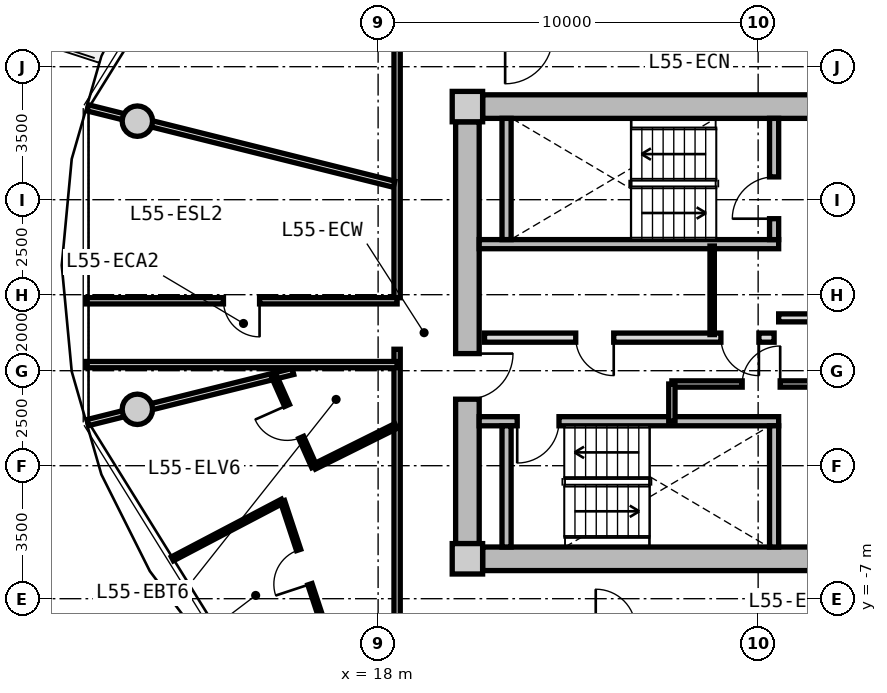
"""IFC4 building model, lengths in metres.
Left out: names, types, materials, properties, quantities, classifications, styles, units other than length and angle.
Written with IfcOpenShell. Run it as: python <this file> out.ifc"""

import sys

from ifc_helpers import new_model, si_unit, direction, frame, frame_2d, origin, origin_2d, place, context, subcontext, project, spatial, rectangle, circle, extrude, source, transform, mapped, element, fill, save


model = new_model("IFC4")
c1 = context("Model", 3, precision=1e-05, world=origin(), true_north=direction((0.0, 1.0)))
c2 = subcontext(c1, "Body", "Model", "MODEL_VIEW")
j1 = project(units=[si_unit("LENGTHUNIT", "METRE"), si_unit("PLANEANGLEUNIT", "RADIAN")], contexts=[c1])
p1 = place(None, origin())
s1 = spatial("IfcSite", under=j1, at=p1, CompositionType="ELEMENT")
p2 = place(p1, origin())
s2 = spatial("IfcBuilding", under=s1, at=p2, CompositionType="ELEMENT")
p3 = place(p2, frame((0.0, 0.0, 177.0)))
s3 = spatial("IfcBuildingStorey", under=s2, at=p3, CompositionType="ELEMENT", Elevation=177.0)
m1 = source(origin(), c2, "Body", "SweptSolid", [
    extrude(rectangle(XDim=0.8, YDim=0.8, at=origin_2d()), origin(), (0.0, 0.0, 1.0), 3.05),
])
for number, where, z_axis, x_axis in (
    (1, (20.35, -5.95, 0.0), (0.0, 0.0, 1.0), (1.0, 0.0, 0.0)),
    (2, (20.35, 5.95, 0.0), (0.0, 0.0, 1.0), (1.0, 0.0, 0.0)),
):
    element("IfcColumn", number, at=place(p3, frame(where, z_axis=z_axis, x_axis=x_axis)), inside=s3, PredefinedType="COLUMN", context=c2, shape_type="MappedRepresentation", body=[
        mapped(m1, transform((0.0, 0.0, 0.0), x_axis=(1.0, 0.0, 0.0), y_axis=(0.0, 1.0, 0.0), z_axis=(0.0, 0.0, 1.0), scale=1.0)),
    ])
m2 = source(origin(), c2, "Body", "SweptSolid", [
    extrude(rectangle(XDim=14.5, YDim=0.62, at=frame_2d((7.25, 0.0))), origin(), (0.0, 0.0, 1.0), 2.81),
])
for number, where, z_axis, x_axis in (
    (3, (20.75, 5.95, 0.0), (0.0, 0.0, 1.0), (1.0, 0.0, 0.0)),
    (4, (35.25, -5.95, 0.0), (0.0, 0.0, 1.0), (-1.0, 0.0, 0.0)),
):
    element("IfcWall", number, at=place(p3, frame(where, z_axis=z_axis, x_axis=x_axis)), inside=s3, PredefinedType="SHEAR", context=c2, shape_type="MappedRepresentation", body=[
        mapped(m2, transform((0.0, 0.0, 0.0), x_axis=(1.0, 0.0, 0.0), y_axis=(0.0, 1.0, 0.0), z_axis=(0.0, 0.0, 1.0), scale=1.0)),
    ])
m3 = source(origin(), c2, "Body", "SweptSolid", [
    extrude(rectangle(XDim=11.1, YDim=0.62, at=frame_2d((5.55, 0.0))), origin(), (0.0, 0.0, 1.0), 2.81),
])
p4 = place(p3, frame((20.35, -5.55, 0.0), z_axis=(0.0, 0.0, 1.0), x_axis=(0.0, 1.0, 0.0)))
e5 = element("IfcWall", 5, at=p4, inside=s3, PredefinedType="SHEAR", context=c2, shape_type="MappedRepresentation", body=[
    mapped(m3, transform((0.0, 0.0, 0.0), x_axis=(1.0, 0.0, 0.0), y_axis=(0.0, 1.0, 0.0), z_axis=(0.0, 0.0, 1.0), scale=1.0)),
])
p5 = place(p4, frame((3.8, 0.0, 0.0)))
e6 = element("IfcOpeningElement", 6, at=p5, cuts=e5, PredefinedType="OPENING", context=c2, shape_type="SweptSolid", body=[
    extrude(rectangle(XDim=1.2, YDim=2.15, at=frame_2d((0.6, 1.075))), frame((0.0, 0.32, 0.0), z_axis=(0.0, -1.0, 0.0), x_axis=(1.0, 0.0, 0.0)), (0.0, 0.0, 1.0), 0.64),
])
m4 = source(origin(), c2, "Body", "SweptSolid", [
    extrude(circle(Radius=0.4, at=origin_2d()), origin(), (0.0, 0.0, 1.0), 3.05),
])
for number, where, z_axis, x_axis in (
    (7, (11.665, 5.567, 0.0), (0.0, 0.0, 1.0), (1.0, 0.0, 0.0)),
    (8, (11.665, -2.016, 0.0), (0.0, 0.0, 1.0), (1.0, 0.0, 0.0)),
):
    element("IfcColumn", number, at=place(p3, frame(where, z_axis=z_axis, x_axis=x_axis)), inside=s3, PredefinedType="COLUMN", context=c2, shape_type="MappedRepresentation", body=[
        mapped(m4, transform((0.0, 0.0, 0.0), x_axis=(1.0, 0.0, 0.0), y_axis=(0.0, 1.0, 0.0), z_axis=(0.0, 0.0, 1.0), scale=1.0)),
    ])
m5 = source(origin(), c2, "Body", "SweptSolid", [
    extrude(rectangle(XDim=7.88, YDim=0.24, at=frame_2d((3.94, 0.0))), origin(), (0.0, 0.0, 1.0), 2.81),
])
p6 = place(p3, frame((20.66, 2.33, 0.0), z_axis=(0.0, 0.0, 1.0), x_axis=(1.0, 0.0, 0.0)))
e9 = element("IfcWall", 9, at=p6, inside=s3, PredefinedType="PARTITIONING", context=c2, shape_type="MappedRepresentation", body=[
    mapped(m5, transform((0.0, 0.0, 0.0), x_axis=(1.0, 0.0, 0.0), y_axis=(0.0, 1.0, 0.0), z_axis=(0.0, 0.0, 1.0), scale=1.0)),
])
m6 = source(origin(), c2, "Body", "SweptSolid", [
    extrude(rectangle(XDim=3.19, YDim=0.24, at=frame_2d((1.595, 0.0))), origin(), (0.0, 0.0, 1.0), 2.81),
])
p7 = place(p3, frame((21.38, 2.45, 0.0), z_axis=(0.0, 0.0, 1.0), x_axis=(0.0, 1.0, 0.0)))
e10 = element("IfcWall", 10, at=p7, inside=s3, PredefinedType="PARTITIONING", context=c2, shape_type="MappedRepresentation", body=[
    mapped(m6, transform((0.0, 0.0, 0.0), x_axis=(1.0, 0.0, 0.0), y_axis=(0.0, 1.0, 0.0), z_axis=(0.0, 0.0, 1.0), scale=1.0)),
])
p8 = place(p3, frame((28.42, 2.45, 0.0), z_axis=(0.0, 0.0, 1.0), x_axis=(0.0, 1.0, 0.0)))
e11 = element("IfcWall", 11, at=p8, inside=s3, PredefinedType="PARTITIONING", context=c2, shape_type="MappedRepresentation", body=[
    mapped(m6, transform((0.0, 0.0, 0.0), x_axis=(1.0, 0.0, 0.0), y_axis=(0.0, 1.0, 0.0), z_axis=(0.0, 0.0, 1.0), scale=1.0)),
])
p9 = place(p8, frame((0.55, 0.0, 0.0)))
e12 = element("IfcOpeningElement", 12, at=p9, cuts=e11, PredefinedType="OPENING", context=c2, shape_type="SweptSolid", body=[
    extrude(rectangle(XDim=1.1, YDim=2.15, at=frame_2d((0.55, 1.075))), frame((0.0, 0.13, 0.0), z_axis=(0.0, -1.0, 0.0), x_axis=(1.0, 0.0, 0.0)), (0.0, 0.0, 1.0), 0.26),
])
p10 = place(p3, frame((20.66, -2.33, 0.0), z_axis=(0.0, 0.0, 1.0), x_axis=(1.0, 0.0, 0.0)))
e13 = element("IfcWall", 13, at=p10, inside=s3, PredefinedType="PARTITIONING", context=c2, shape_type="MappedRepresentation", body=[
    mapped(m5, transform((0.0, 0.0, 0.0), x_axis=(1.0, 0.0, 0.0), y_axis=(0.0, 1.0, 0.0), z_axis=(0.0, 0.0, 1.0), scale=1.0)),
])
p11 = place(p10, frame((1.0, 0.0, 0.0)))
e14 = element("IfcOpeningElement", 14, at=p11, cuts=e13, PredefinedType="OPENING", context=c2, shape_type="SweptSolid", body=[
    extrude(rectangle(XDim=1.1, YDim=2.15, at=frame_2d((0.55, 1.075))), frame((0.0, 0.13, 0.0), z_axis=(0.0, -1.0, 0.0), x_axis=(1.0, 0.0, 0.0)), (0.0, 0.0, 1.0), 0.26),
])
for number, where, z_axis, x_axis in (
    (15, (21.38, -5.64, 0.0), (0.0, 0.0, 1.0), (0.0, 1.0, 0.0)),
    (16, (28.42, -5.64, 0.0), (0.0, 0.0, 1.0), (0.0, 1.0, 0.0)),
):
    element("IfcWall", number, at=place(p3, frame(where, z_axis=z_axis, x_axis=x_axis)), inside=s3, PredefinedType="PARTITIONING", context=c2, shape_type="MappedRepresentation", body=[
        mapped(m6, transform((0.0, 0.0, 0.0), x_axis=(1.0, 0.0, 0.0), y_axis=(0.0, 1.0, 0.0), z_axis=(0.0, 0.0, 1.0), scale=1.0)),
    ])
m7 = source(origin(), c2, "Body", "SweptSolid", [
    extrude(rectangle(XDim=6.66, YDim=0.21, at=frame_2d((3.33, 0.0))), origin(), (0.0, 0.0, 1.0), 2.795),
])
p12 = place(p3, frame((28.54, 0.39, 0.0), z_axis=(0.0, 0.0, 1.0), x_axis=(1.0, 0.0, 0.0)))
e17 = element("IfcWall", 17, at=p12, inside=s3, PredefinedType="PARTITIONING", context=c2, shape_type="MappedRepresentation", body=[
    mapped(m7, transform((0.0, 0.0, 0.0), x_axis=(1.0, 0.0, 0.0), y_axis=(0.0, 1.0, 0.0), z_axis=(0.0, 0.0, 1.0), scale=1.0)),
])
p13 = place(p12, frame((1.0, 0.0, 0.0)))
e18 = element("IfcOpeningElement", 18, at=p13, cuts=e17, PredefinedType="OPENING", context=c2, shape_type="SweptSolid", body=[
    extrude(rectangle(XDim=1.2, YDim=2.15, at=frame_2d((0.6, 1.075))), frame((0.0, 0.115, 0.0), z_axis=(0.0, -1.0, 0.0), x_axis=(1.0, 0.0, 0.0)), (0.0, 0.0, 1.0), 0.23),
])
m8 = source(origin(), c2, "Body", "SweptSolid", [
    extrude(rectangle(XDim=7.62, YDim=0.24, at=frame_2d((3.81, 0.0))), origin(), (0.0, 0.0, 1.0), 2.795),
])
p14 = place(p3, frame((20.8, -0.13, 0.0), z_axis=(0.0, 0.0, 1.0), x_axis=(1.0, 0.0, 0.0)))
e19 = element("IfcWall", 19, at=p14, inside=s3, PredefinedType="PARTITIONING", context=c2, shape_type="MappedRepresentation", body=[
    mapped(m8, transform((0.0, 0.0, 0.0), x_axis=(1.0, 0.0, 0.0), y_axis=(0.0, 1.0, 0.0), z_axis=(0.0, 0.0, 1.0), scale=1.0)),
])
p15 = place(p14, frame((6.22, 0.0, 0.0)))
e20 = element("IfcOpeningElement", 20, at=p15, cuts=e19, PredefinedType="OPENING", context=c2, shape_type="SweptSolid", body=[
    extrude(rectangle(XDim=1.0, YDim=2.1, at=frame_2d((0.5, 1.05))), frame((0.0, 0.13, 0.0), z_axis=(0.0, -1.0, 0.0), x_axis=(1.0, 0.0, 0.0)), (0.0, 0.0, 1.0), 0.26),
])
p16 = place(p14, frame((2.4, 0.0, 0.0)))
e21 = element("IfcOpeningElement", 21, at=p16, cuts=e19, PredefinedType="OPENING", context=c2, shape_type="SweptSolid", body=[
    extrude(rectangle(XDim=1.0, YDim=2.1, at=frame_2d((0.5, 1.05))), frame((0.0, 0.13, 0.0), z_axis=(0.0, -1.0, 0.0), x_axis=(1.0, 0.0, 0.0)), (0.0, 0.0, 1.0), 0.26),
])
m9 = source(origin(), c2, "Body", "SweptSolid", [
    extrude(rectangle(XDim=2.33, YDim=0.115, at=frame_2d((1.165, 0.0))), origin(), (0.0, 0.0, 1.0), 2.795),
])
p17 = place(p3, frame((26.79, -0.05, 0.0), z_axis=(0.0, 0.0, 1.0), x_axis=(0.0, 1.0, 0.0)))
e22 = element("IfcWall", 22, at=p17, inside=s3, PredefinedType="PARTITIONING", context=c2, shape_type="MappedRepresentation", body=[
    mapped(m9, transform((0.0, 0.0, 0.0), x_axis=(1.0, 0.0, 0.0), y_axis=(0.0, 1.0, 0.0), z_axis=(0.0, 0.0, 1.0), scale=1.0)),
])
m10 = source(origin(), c2, "Body", "SweptSolid", [
    extrude(rectangle(XDim=4.77, YDim=0.165, at=frame_2d((2.385, 0.0))), origin(), (0.0, 0.0, 1.0), 2.795),
])
p18 = place(p3, frame((25.73, -1.35, 0.0), z_axis=(0.0, 0.0, 1.0), x_axis=(1.0, 0.0, 0.0)))
e23 = element("IfcWall", 23, at=p18, inside=s3, PredefinedType="PARTITIONING", context=c2, shape_type="MappedRepresentation", body=[
    mapped(m10, transform((0.0, 0.0, 0.0), x_axis=(1.0, 0.0, 0.0), y_axis=(0.0, 1.0, 0.0), z_axis=(0.0, 0.0, 1.0), scale=1.0)),
])
p19 = place(p18, frame((1.85, 0.0, 0.0)))
e24 = element("IfcOpeningElement", 24, at=p19, cuts=e23, PredefinedType="OPENING", context=c2, shape_type="SweptSolid", body=[
    extrude(rectangle(XDim=1.0, YDim=2.1, at=frame_2d((0.5, 1.05))), frame((0.0, 0.093, 0.0), z_axis=(0.0, -1.0, 0.0), x_axis=(1.0, 0.0, 0.0)), (0.0, 0.0, 1.0), 0.185),
])
m11 = source(origin(), c2, "Body", "SweptSolid", [
    extrude(rectangle(XDim=0.98, YDim=0.165, at=frame_2d((0.49, 0.0))), origin(), (0.0, 0.0, 1.0), 2.795),
])
p20 = place(p3, frame((25.73, -2.33, 0.0), z_axis=(0.0, 0.0, 1.0), x_axis=(0.0, 1.0, 0.0)))
e25 = element("IfcWall", 25, at=p20, inside=s3, PredefinedType="PARTITIONING", context=c2, shape_type="MappedRepresentation", body=[
    mapped(m11, transform((0.0, 0.0, 0.0), x_axis=(1.0, 0.0, 0.0), y_axis=(0.0, 1.0, 0.0), z_axis=(0.0, 0.0, 1.0), scale=1.0)),
])
m12 = source(origin(), c2, "Body", "SweptSolid", [
    extrude(rectangle(XDim=7.365, YDim=0.165, at=frame_2d((3.682, 0.0))), origin(), (0.0, 0.0, 1.0), 2.795),
])
p21 = place(p3, frame((18.5, -7.8, 0.0), z_axis=(0.0, 0.0, 1.0), x_axis=(0.0, 1.0, 0.0)))
e26 = element("IfcWall", 26, at=p21, inside=s3, PredefinedType="PARTITIONING", context=c2, shape_type="MappedRepresentation", body=[
    mapped(m12, transform((0.0, 0.0, 0.0), x_axis=(1.0, 0.0, 0.0), y_axis=(0.0, 1.0, 0.0), z_axis=(0.0, 0.0, 1.0), scale=1.0)),
])
m13 = source(origin(), c2, "Body", "SweptSolid", [
    extrude(rectangle(XDim=6.88, YDim=0.165, at=frame_2d((3.44, 0.0))), origin(), (0.0, 0.0, 1.0), 2.795),
])
p22 = place(p3, frame((18.5, 0.92, 0.0), z_axis=(0.0, 0.0, 1.0), x_axis=(0.0, 1.0, 0.0)))
e27 = element("IfcWall", 27, at=p22, inside=s3, PredefinedType="PARTITIONING", context=c2, shape_type="MappedRepresentation", body=[
    mapped(m13, transform((0.0, 0.0, 0.0), x_axis=(1.0, 0.0, 0.0), y_axis=(0.0, 1.0, 0.0), z_axis=(0.0, 0.0, 1.0), scale=1.0)),
])
m14 = source(origin(), c2, "Body", "SweptSolid", [
    extrude(rectangle(XDim=8.305, YDim=0.165, at=frame_2d((4.153, 0.0))), origin(), (0.0, 0.0, 1.0), 2.345),
])
p23 = place(p3, frame((18.42, 3.908, 0.0), z_axis=(0.0, 0.0, 1.0), x_axis=(-0.970309994378, 0.241864662175, 0.0)))
e28 = element("IfcWall", 28, at=p23, inside=s3, PredefinedType="PARTITIONING", context=c2, shape_type="MappedRepresentation", body=[
    mapped(m14, transform((0.0, 0.0, 0.0), x_axis=(1.0, 0.0, 0.0), y_axis=(0.0, 1.0, 0.0), z_axis=(0.0, 0.0, 1.0), scale=1.0)),
])
m15 = source(origin(), c2, "Body", "SweptSolid", [
    extrude(rectangle(XDim=5.564, YDim=0.165, at=frame_2d((2.782, 0.0))), origin(), (0.0, 0.0, 1.0), 2.345),
])
p24 = place(p3, frame((15.76, -1.02, 0.0), z_axis=(0.0, 0.0, 1.0), x_axis=(-0.970315176167, -0.241843872984, 0.0)))
e29 = element("IfcWall", 29, at=p24, inside=s3, PredefinedType="PARTITIONING", context=c2, shape_type="MappedRepresentation", body=[
    mapped(m15, transform((0.0, 0.0, 0.0), x_axis=(1.0, 0.0, 0.0), y_axis=(0.0, 1.0, 0.0), z_axis=(0.0, 0.0, 1.0), scale=1.0)),
])
m16 = source(origin(), c2, "Body", "SweptSolid", [
    extrude(rectangle(XDim=8.189, YDim=0.165, at=frame_2d((4.094, 0.0))), origin(), (0.0, 0.0, 1.0), 2.795),
])
p25 = place(p3, frame((10.311, 0.84, 0.0), z_axis=(0.0, 0.0, 1.0), x_axis=(1.0, 0.0, 0.0)))
e30 = element("IfcWall", 30, at=p25, inside=s3, PredefinedType="PARTITIONING", context=c2, shape_type="MappedRepresentation", body=[
    mapped(m16, transform((0.0, 0.0, 0.0), x_axis=(1.0, 0.0, 0.0), y_axis=(0.0, 1.0, 0.0), z_axis=(0.0, 0.0, 1.0), scale=1.0)),
])
p26 = place(p25, frame((3.619, 0.0, 0.0)))
e31 = element("IfcOpeningElement", 31, at=p26, cuts=e30, PredefinedType="OPENING", context=c2, shape_type="SweptSolid", body=[
    extrude(rectangle(XDim=0.95, YDim=2.1, at=frame_2d((0.475, 1.05))), frame((0.0, 0.093, 0.0), z_axis=(0.0, -1.0, 0.0), x_axis=(1.0, 0.0, 0.0)), (0.0, 0.0, 1.0), 0.185),
])
p27 = place(p3, frame((18.5, -0.84, 0.0), z_axis=(0.0, 0.0, 1.0), x_axis=(-1.0, 0.0, 0.0)))
e32 = element("IfcWall", 32, at=p27, inside=s3, PredefinedType="PARTITIONING", context=c2, shape_type="MappedRepresentation", body=[
    mapped(m16, transform((0.0, 0.0, 0.0), x_axis=(1.0, 0.0, 0.0), y_axis=(0.0, 1.0, 0.0), z_axis=(0.0, 0.0, 1.0), scale=1.0)),
])
m17 = source(origin(), c2, "Body", "SweptSolid", [
    extrude(rectangle(XDim=2.403, YDim=0.14, at=frame_2d((1.201, 0.0))), origin(), (0.0, 0.0, 1.0), 2.795),
])
p28 = place(p3, frame((18.47, -2.456, 0.0), z_axis=(0.0, 0.0, 1.0), x_axis=(-0.895339866084, -0.445383569748, 0.0)))
e33 = element("IfcWall", 33, at=p28, inside=s3, PredefinedType="PARTITIONING", context=c2, shape_type="MappedRepresentation", body=[
    mapped(m17, transform((0.0, 0.0, 0.0), x_axis=(1.0, 0.0, 0.0), y_axis=(0.0, 1.0, 0.0), z_axis=(0.0, 0.0, 1.0), scale=1.0)),
])
m18 = source(origin(), c2, "Body", "SweptSolid", [
    extrude(rectangle(XDim=2.606, YDim=0.14, at=frame_2d((1.303, 0.0))), origin(), (0.0, 0.0, 1.0), 2.795),
])
p29 = place(p3, frame((16.319, -3.526, 0.0), z_axis=(0.0, 0.0, 1.0), x_axis=(-0.405599540311, 0.914050880914, 0.0)))
e34 = element("IfcWall", 34, at=p29, inside=s3, PredefinedType="PARTITIONING", context=c2, shape_type="MappedRepresentation", body=[
    mapped(m18, transform((0.0, 0.0, 0.0), x_axis=(1.0, 0.0, 0.0), y_axis=(0.0, 1.0, 0.0), z_axis=(0.0, 0.0, 1.0), scale=1.0)),
])
p30 = place(p29, frame((0.843, 0.0, 0.0)))
e35 = element("IfcOpeningElement", 35, at=p30, cuts=e34, PredefinedType="OPENING", context=c2, shape_type="SweptSolid", body=[
    extrude(rectangle(XDim=0.92, YDim=2.1, at=frame_2d((0.46, 1.05))), frame((0.0, 0.08, 0.0), z_axis=(0.0, -1.0, 0.0), x_axis=(1.0, 0.0, 0.0)), (0.0, 0.0, 1.0), 0.16),
])
m19 = source(origin(), c2, "Body", "SweptSolid", [
    extrude(rectangle(XDim=3.272, YDim=0.115, at=frame_2d((1.636, 0.0))), origin(), (0.0, 0.0, 1.0), 2.795),
])
p31 = place(p3, frame((15.484, -4.432, 0.0), z_axis=(0.0, 0.0, 1.0), x_axis=(-0.885479276486, -0.464678868589, 0.0)))
e36 = element("IfcWall", 36, at=p31, inside=s3, PredefinedType="PARTITIONING", context=c2, shape_type="MappedRepresentation", body=[
    mapped(m19, transform((0.0, 0.0, 0.0), x_axis=(1.0, 0.0, 0.0), y_axis=(0.0, 1.0, 0.0), z_axis=(0.0, 0.0, 1.0), scale=1.0)),
])
m20 = source(origin(), c2, "Body", "SweptSolid", [
    extrude(rectangle(XDim=3.656, YDim=0.115, at=frame_2d((1.828, 0.0))), origin(), (0.0, 0.0, 1.0), 2.795),
])
p32 = place(p3, frame((15.484, -4.432, 0.0), z_axis=(0.0, 0.0, 1.0), x_axis=(0.313602075194, -0.949554494715, 0.0)))
e37 = element("IfcWall", 37, at=p32, inside=s3, PredefinedType="PARTITIONING", context=c2, shape_type="MappedRepresentation", body=[
    mapped(m20, transform((0.0, 0.0, 0.0), x_axis=(1.0, 0.0, 0.0), y_axis=(0.0, 1.0, 0.0), z_axis=(0.0, 0.0, 1.0), scale=1.0)),
])
p33 = place(p32, frame((1.353, 0.0, 0.0)))
e38 = element("IfcOpeningElement", 38, at=p33, cuts=e37, PredefinedType="OPENING", context=c2, shape_type="SweptSolid", body=[
    extrude(rectangle(XDim=0.95, YDim=2.1, at=frame_2d((0.475, 1.05))), frame((0.0, 0.067, 0.0), z_axis=(0.0, -1.0, 0.0), x_axis=(1.0, 0.0, 0.0)), (0.0, 0.0, 1.0), 0.135),
])
m21 = source(origin(), c2, "Body", "SweptSolid", [
    extrude(rectangle(XDim=1.1, YDim=2.15, at=frame_2d((0.55, 1.075))), frame((0.0, 0.025, 0.0), z_axis=(0.0, -1.0, 0.0), x_axis=(1.0, 0.0, 0.0)), (0.0, 0.0, 1.0), 0.05),
])
p34 = place(p9, origin())
e39 = element("IfcDoor", 39, at=p34, inside=s3, OperationType="SINGLE_SWING_LEFT", PredefinedType="DOOR", context=c2, shape_type="MappedRepresentation", body=[
    mapped(m21, transform((0.0, 0.0, 0.0), x_axis=(1.0, 0.0, 0.0), y_axis=(0.0, 1.0, 0.0), z_axis=(0.0, 0.0, 1.0), scale=1.0)),
])
fill(e12, e39)
p35 = place(p11, frame((1.1, 0.0, 0.0), z_axis=(0.0, 0.0, 1.0), x_axis=(-1.0, 0.0, 0.0)))
e40 = element("IfcDoor", 40, at=p35, inside=s3, OperationType="SINGLE_SWING_RIGHT", PredefinedType="DOOR", context=c2, shape_type="MappedRepresentation", body=[
    mapped(m21, transform((0.0, 0.0, 0.0), x_axis=(1.0, 0.0, 0.0), y_axis=(0.0, 1.0, 0.0), z_axis=(0.0, 0.0, 1.0), scale=1.0)),
])
fill(e14, e40)
m22 = source(origin(), c2, "Body", "SweptSolid", [
    extrude(rectangle(XDim=1.2, YDim=2.15, at=frame_2d((0.6, 1.075))), frame((0.0, 0.025, 0.0), z_axis=(0.0, -1.0, 0.0), x_axis=(1.0, 0.0, 0.0)), (0.0, 0.0, 1.0), 0.05),
])
p36 = place(p5, frame((1.2, 0.0, 0.0), z_axis=(0.0, 0.0, 1.0), x_axis=(-1.0, 0.0, 0.0)))
e41 = element("IfcDoor", 41, at=p36, inside=s3, OperationType="SINGLE_SWING_LEFT", PredefinedType="DOOR", context=c2, shape_type="MappedRepresentation", body=[
    mapped(m22, transform((0.0, 0.0, 0.0), x_axis=(1.0, 0.0, 0.0), y_axis=(0.0, 1.0, 0.0), z_axis=(0.0, 0.0, 1.0), scale=1.0)),
])
fill(e6, e41)
m23 = source(origin(), c2, "Body", "SweptSolid", [
    extrude(rectangle(XDim=1.0, YDim=2.1, at=frame_2d((0.5, 1.05))), frame((0.0, 0.025, 0.0), z_axis=(0.0, -1.0, 0.0), x_axis=(1.0, 0.0, 0.0)), (0.0, 0.0, 1.0), 0.05),
])
p37 = place(p15, frame((1.0, 0.0, 0.0), z_axis=(0.0, 0.0, 1.0), x_axis=(-1.0, 0.0, 0.0)))
e42 = element("IfcDoor", 42, at=p37, inside=s3, OperationType="SINGLE_SWING_LEFT", PredefinedType="DOOR", context=c2, shape_type="MappedRepresentation", body=[
    mapped(m23, transform((0.0, 0.0, 0.0), x_axis=(1.0, 0.0, 0.0), y_axis=(0.0, 1.0, 0.0), z_axis=(0.0, 0.0, 1.0), scale=1.0)),
])
fill(e20, e42)
p38 = place(p16, frame((1.0, 0.0, 0.0), z_axis=(0.0, 0.0, 1.0), x_axis=(-1.0, 0.0, 0.0)))
e43 = element("IfcDoor", 43, at=p38, inside=s3, OperationType="SINGLE_SWING_LEFT", PredefinedType="DOOR", context=c2, shape_type="MappedRepresentation", body=[
    mapped(m23, transform((0.0, 0.0, 0.0), x_axis=(1.0, 0.0, 0.0), y_axis=(0.0, 1.0, 0.0), z_axis=(0.0, 0.0, 1.0), scale=1.0)),
])
fill(e21, e43)
p39 = place(p19, origin())
e44 = element("IfcDoor", 44, at=p39, inside=s3, OperationType="SINGLE_SWING_RIGHT", PredefinedType="DOOR", context=c2, shape_type="MappedRepresentation", body=[
    mapped(m23, transform((0.0, 0.0, 0.0), x_axis=(1.0, 0.0, 0.0), y_axis=(0.0, 1.0, 0.0), z_axis=(0.0, 0.0, 1.0), scale=1.0)),
])
fill(e24, e44)
m24 = source(origin(), c2, "Body", "SweptSolid", [
    extrude(rectangle(XDim=0.95, YDim=2.1, at=frame_2d((0.475, 1.05))), frame((0.0, 0.025, 0.0), z_axis=(0.0, -1.0, 0.0), x_axis=(1.0, 0.0, 0.0)), (0.0, 0.0, 1.0), 0.05),
])
p40 = place(p26, frame((0.95, 0.0, 0.0), z_axis=(0.0, 0.0, 1.0), x_axis=(-1.0, 0.0, 0.0)))
e45 = element("IfcDoor", 45, at=p40, inside=s3, OperationType="SINGLE_SWING_LEFT", PredefinedType="DOOR", context=c2, shape_type="MappedRepresentation", body=[
    mapped(m24, transform((0.0, 0.0, 0.0), x_axis=(1.0, 0.0, 0.0), y_axis=(0.0, 1.0, 0.0), z_axis=(0.0, 0.0, 1.0), scale=1.0)),
])
fill(e31, e45)
m25 = source(origin(), c2, "Body", "SweptSolid", [
    extrude(rectangle(XDim=0.92, YDim=2.1, at=frame_2d((0.46, 1.05))), frame((0.0, 0.025, 0.0), z_axis=(0.0, -1.0, 0.0), x_axis=(1.0, 0.0, 0.0)), (0.0, 0.0, 1.0), 0.05),
])
p41 = place(p30, origin())
e46 = element("IfcDoor", 46, at=p41, inside=s3, OperationType="SINGLE_SWING_RIGHT", PredefinedType="DOOR", context=c2, shape_type="MappedRepresentation", body=[
    mapped(m25, transform((0.0, 0.0, 0.0), x_axis=(1.0, 0.0, 0.0), y_axis=(0.0, 1.0, 0.0), z_axis=(0.0, 0.0, 1.0), scale=1.0)),
])
fill(e35, e46)
p42 = place(p33, frame((0.95, 0.0, 0.0), z_axis=(0.0, 0.0, 1.0), x_axis=(-1.0, 0.0, 0.0)))
e47 = element("IfcDoor", 47, at=p42, inside=s3, OperationType="SINGLE_SWING_LEFT", PredefinedType="DOOR", context=c2, shape_type="MappedRepresentation", body=[
    mapped(m24, transform((0.0, 0.0, 0.0), x_axis=(1.0, 0.0, 0.0), y_axis=(0.0, 1.0, 0.0), z_axis=(0.0, 0.0, 1.0), scale=1.0)),
])
fill(e38, e47)
save(model, sys.argv[1])
